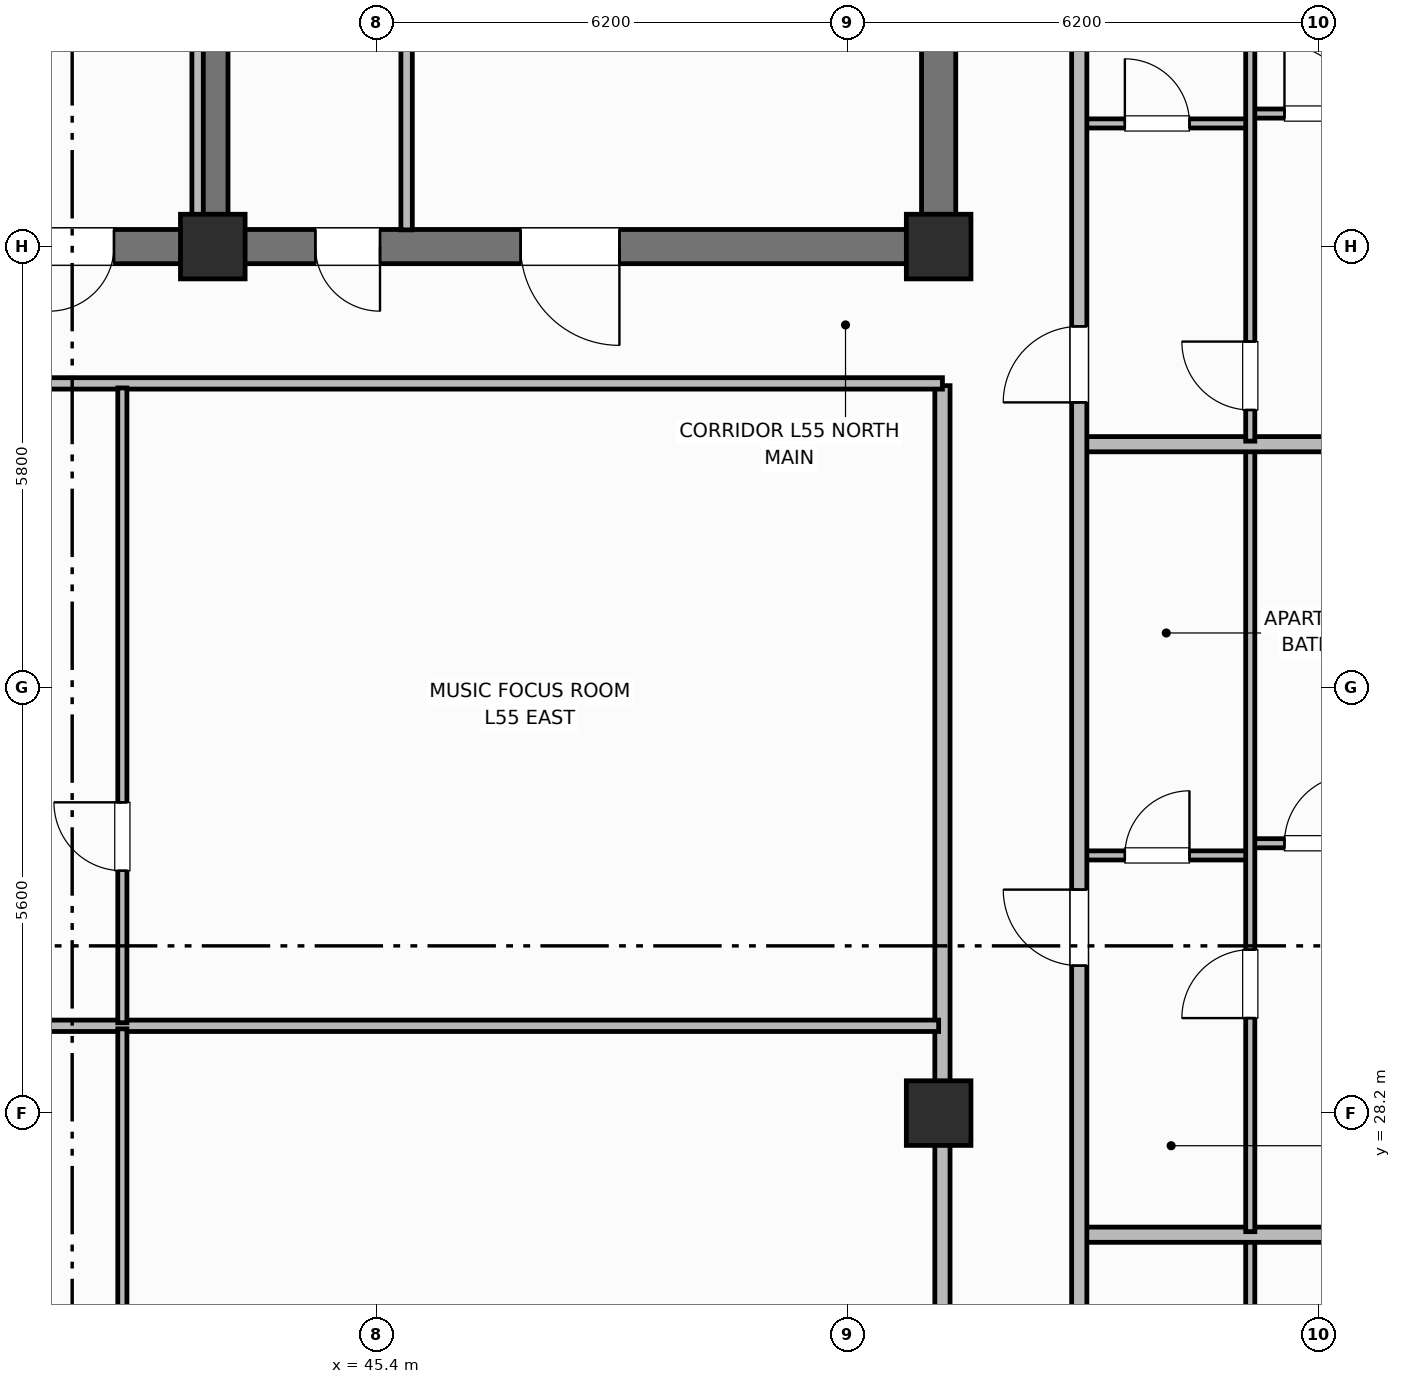
"""IFC4 building model, lengths in metres.
Left out: names, types, materials, properties, quantities, classifications, styles, units other than length and angle.
Written with IfcOpenShell. Run it as: python <this file> out.ifc"""

import sys

from ifc_helpers import new_model, si_unit, direction, frame, frame_2d, origin, origin_2d, place, context, subcontext, project, spatial, rectangle, extrude, element, fill, save


model = new_model("IFC4")
c1 = context("Model", 3, precision=1e-05, world=origin(), true_north=direction((0.0, 1.0)))
c2 = subcontext(c1, "Body", "Model", "MODEL_VIEW")
j1 = project(units=[si_unit("LENGTHUNIT", "METRE"), si_unit("PLANEANGLEUNIT", "RADIAN")], contexts=[c1])
p1 = place(None, origin())
s1 = spatial("IfcSite", under=j1, at=p1, CompositionType="ELEMENT")
p2 = place(p1, origin())
s2 = spatial("IfcBuilding", under=s1, at=p2, CompositionType="ELEMENT")
p3 = place(p2, frame((0.0, 0.0, 222.1)))
s3 = spatial("IfcBuildingStorey", under=s2, at=p3, CompositionType="ELEMENT", Elevation=222.1)
p4 = place(p3, frame((52.8, 39.825, 0.0), z_axis=(0.0, 0.0, 1.0), x_axis=(0.0, 1.0, 0.0)))
e1 = element("IfcWall", 1, at=p4, inside=s3, PredefinedType="SHEAR", context=c2, shape_type="SweptSolid", body=[
    extrude(rectangle(XDim=5.75, YDim=0.45, at=frame_2d((2.875, 0.0))), origin(), (0.0, 0.0, 1.0), 3.7),
])
p5 = place(p3, frame((52.8, 39.6, 0.0), z_axis=(0.0, 0.0, 1.0), x_axis=(-1.0, 0.0, 0.0)))
e2 = element("IfcWall", 2, at=p5, inside=s3, PredefinedType="SHEAR", context=c2, shape_type="SweptSolid", body=[
    extrude(rectangle(XDim=27.2, YDim=0.45, at=frame_2d((13.6, 0.0))), origin(), (0.0, 0.0, 1.0), 3.7),
])
p6 = place(p5, frame((24.3, 0.0, 0.0)))
e3 = element("IfcOpeningElement", 3, at=p6, cuts=e2, PredefinedType="OPENING", context=c2, shape_type="SweptSolid", body=[
    extrude(rectangle(XDim=1.1, YDim=2.15, at=frame_2d((0.55, 1.075))), frame((0.0, 0.235, 0.0), z_axis=(0.0, -1.0, 0.0), x_axis=(1.0, 0.0, 0.0)), (0.0, 0.0, 1.0), 0.47),
])
p7 = place(p5, frame((21.85, 0.0, 0.0)))
e4 = element("IfcOpeningElement", 4, at=p7, cuts=e2, PredefinedType="OPENING", context=c2, shape_type="SweptSolid", body=[
    extrude(rectangle(XDim=0.85, YDim=2.1, at=frame_2d((0.425, 1.05))), frame((0.0, 0.235, 0.0), z_axis=(0.0, -1.0, 0.0), x_axis=(1.0, 0.0, 0.0)), (0.0, 0.0, 1.0), 0.47),
])
p8 = place(p5, frame((19.85, 0.0, 0.0)))
e5 = element("IfcOpeningElement", 5, at=p8, cuts=e2, PredefinedType="OPENING", context=c2, shape_type="SweptSolid", body=[
    extrude(rectangle(XDim=0.85, YDim=2.1, at=frame_2d((0.425, 1.05))), frame((0.0, 0.235, 0.0), z_axis=(0.0, -1.0, 0.0), x_axis=(1.0, 0.0, 0.0)), (0.0, 0.0, 1.0), 0.47),
])
p9 = place(p5, frame((15.1, 0.0, 0.0)))
e6 = element("IfcOpeningElement", 6, at=p9, cuts=e2, PredefinedType="OPENING", context=c2, shape_type="SweptSolid", body=[
    extrude(rectangle(XDim=1.2, YDim=2.15, at=frame_2d((0.6, 1.075))), frame((0.0, 0.235, 0.0), z_axis=(0.0, -1.0, 0.0), x_axis=(1.0, 0.0, 0.0)), (0.0, 0.0, 1.0), 0.47),
])
p10 = place(p5, frame((12.6, 0.0, 0.0)))
e7 = element("IfcOpeningElement", 7, at=p10, cuts=e2, PredefinedType="OPENING", context=c2, shape_type="SweptSolid", body=[
    extrude(rectangle(XDim=0.85, YDim=2.1, at=frame_2d((0.425, 1.05))), frame((0.0, 0.235, 0.0), z_axis=(0.0, -1.0, 0.0), x_axis=(1.0, 0.0, 0.0)), (0.0, 0.0, 1.0), 0.47),
])
p11 = place(p5, frame((10.85, 0.0, 0.0)))
e8 = element("IfcOpeningElement", 8, at=p11, cuts=e2, PredefinedType="OPENING", context=c2, shape_type="SweptSolid", body=[
    extrude(rectangle(XDim=0.85, YDim=2.1, at=frame_2d((0.425, 1.05))), frame((0.0, 0.235, 0.0), z_axis=(0.0, -1.0, 0.0), x_axis=(1.0, 0.0, 0.0)), (0.0, 0.0, 1.0), 0.47),
])
p12 = place(p5, frame((7.35, 0.0, 0.0)))
e9 = element("IfcOpeningElement", 9, at=p12, cuts=e2, PredefinedType="OPENING", context=c2, shape_type="SweptSolid", body=[
    extrude(rectangle(XDim=0.85, YDim=2.1, at=frame_2d((0.425, 1.05))), frame((0.0, 0.235, 0.0), z_axis=(0.0, -1.0, 0.0), x_axis=(1.0, 0.0, 0.0)), (0.0, 0.0, 1.0), 0.47),
])
p13 = place(p5, frame((4.2, 0.0, 0.0)))
e10 = element("IfcOpeningElement", 10, at=p13, cuts=e2, PredefinedType="OPENING", context=c2, shape_type="SweptSolid", body=[
    extrude(rectangle(XDim=1.3, YDim=2.2, at=frame_2d((0.65, 1.1))), frame((0.0, 0.235, 0.0), z_axis=(0.0, -1.0, 0.0), x_axis=(1.0, 0.0, 0.0)), (0.0, 0.0, 1.0), 0.47),
])
p14 = place(p3, frame((43.25, 39.825, 0.0), z_axis=(0.0, 0.0, 1.0), x_axis=(0.0, 1.0, 0.0)))
e11 = element("IfcWall", 11, at=p14, inside=s3, PredefinedType="SHEAR", context=c2, shape_type="SweptSolid", body=[
    extrude(rectangle(XDim=5.75, YDim=0.4, at=frame_2d((2.875, 0.0))), origin(), (0.0, 0.0, 1.0), 3.7),
])
for number, where, z_axis, x_axis in (
    (12, (43.25, 39.6, 0.0), (0.0, 0.0, 1.0), (1.0, 0.0, 0.0)),
    (13, (52.8, 39.6, 0.0), (0.0, 0.0, 1.0), (1.0, 0.0, 0.0)),
    (14, (52.8, 28.2, 0.0), (0.0, 0.0, 1.0), (1.0, 0.0, 0.0)),
):
    element("IfcColumn", number, at=place(p3, frame(where, z_axis=z_axis, x_axis=x_axis)), inside=s3, PredefinedType="COLUMN", context=c2, shape_type="SweptSolid", body=[
        extrude(rectangle(XDim=0.85, YDim=0.85, at=origin_2d()), origin(), (0.0, 0.0, 1.0), 3.7),
    ])
for number, where, z_axis, x_axis in (
    (15, (43.05, 39.82, 0.0), (0.0, 0.0, 1.0), (0.0, 1.0, 0.0)),
    (16, (45.8, 39.82, 0.0), (0.0, 0.0, 1.0), (0.0, 1.0, 0.0)),
):
    element("IfcWall", number, at=place(p3, frame(where, z_axis=z_axis, x_axis=x_axis)), inside=s3, PredefinedType="PARTITIONING", context=c2, shape_type="SweptSolid", body=[
        extrude(rectangle(XDim=5.63, YDim=0.15, at=frame_2d((2.815, 0.0))), origin(), (0.0, 0.0, 1.0), 2.24),
    ])
p15 = place(p3, frame((52.85, 18.63, 0.0), z_axis=(0.0, 0.0, 1.0), x_axis=(0.0, 1.0, 0.0)))
e17 = element("IfcWall", 17, at=p15, inside=s3, PredefinedType="PARTITIONING", context=c2, shape_type="SweptSolid", body=[
    extrude(rectangle(XDim=19.14, YDim=0.2, at=frame_2d((9.57, 0.0))), origin(), (0.0, 0.0, 1.0), 2.24),
])
p16 = place(p3, frame((31.35, 37.8, 0.0), z_axis=(0.0, 0.0, 1.0), x_axis=(1.0, 0.0, 0.0)))
e18 = element("IfcWall", 18, at=p16, inside=s3, PredefinedType="PARTITIONING", context=c2, shape_type="SweptSolid", body=[
    extrude(rectangle(XDim=21.5, YDim=0.15, at=frame_2d((10.75, 0.0))), origin(), (0.0, 0.0, 1.0), 2.24),
])
p17 = place(p3, frame((31.38, 29.348, 0.0), z_axis=(0.0, 0.0, 1.0), x_axis=(1.0, 0.0, 0.0)))
e19 = element("IfcWall", 19, at=p17, inside=s3, PredefinedType="PARTITIONING", context=c2, shape_type="SweptSolid", body=[
    extrude(rectangle(XDim=21.42, YDim=0.15, at=frame_2d((10.71, 0.0))), origin(), (0.0, 0.0, 1.0), 2.24),
])
p18 = place(p3, frame((42.06, 18.66, 0.0), z_axis=(0.0, 0.0, 1.0), x_axis=(0.0, 1.0, 0.0)))
e20 = element("IfcWall", 20, at=p18, inside=s3, PredefinedType="PARTITIONING", context=c2, shape_type="SweptSolid", body=[
    extrude(rectangle(XDim=10.648, YDim=0.12, at=frame_2d((5.324, 0.0))), origin(), (0.0, 0.0, 1.0), 2.24),
])
p19 = place(p18, frame((2.0, 0.0, 0.0)))
e21 = element("IfcOpeningElement", 21, at=p19, cuts=e20, PredefinedType="OPENING", context=c2, shape_type="SweptSolid", body=[
    extrude(rectangle(XDim=0.9, YDim=2.1, at=frame_2d((0.45, 1.05))), frame((0.0, 0.07, 0.0), z_axis=(0.0, -1.0, 0.0), x_axis=(1.0, 0.0, 0.0)), (0.0, 0.0, 1.0), 0.14),
])
p20 = place(p3, frame((42.06, 29.388, 0.0), z_axis=(0.0, 0.0, 1.0), x_axis=(0.0, 1.0, 0.0)))
e22 = element("IfcWall", 22, at=p20, inside=s3, PredefinedType="PARTITIONING", context=c2, shape_type="SweptSolid", body=[
    extrude(rectangle(XDim=8.352, YDim=0.12, at=frame_2d((4.176, 0.0))), origin(), (0.0, 0.0, 1.0), 2.24),
])
p21 = place(p20, frame((2.0, 0.0, 0.0)))
e23 = element("IfcOpeningElement", 23, at=p21, cuts=e22, PredefinedType="OPENING", context=c2, shape_type="SweptSolid", body=[
    extrude(rectangle(XDim=0.9, YDim=2.1, at=frame_2d((0.45, 1.05))), frame((0.0, 0.07, 0.0), z_axis=(0.0, -1.0, 0.0), x_axis=(1.0, 0.0, 0.0)), (0.0, 0.0, 1.0), 0.14),
])
p22 = place(p3, frame((56.9, 19.44, 0.0), z_axis=(0.0, 0.0, 1.0), x_axis=(0.0, 1.0, 0.0)))
e24 = element("IfcWall", 24, at=p22, inside=s3, PredefinedType="PARTITIONING", context=c2, shape_type="SweptSolid", body=[
    extrude(rectangle(XDim=7.12, YDim=0.12, at=frame_2d((3.56, 0.0))), origin(), (0.0, 0.0, 1.0), 2.24),
])
p23 = place(p22, frame((0.41, 0.0, 0.0)))
e25 = element("IfcOpeningElement", 25, at=p23, cuts=e24, PredefinedType="OPENING", context=c2, shape_type="SweptSolid", body=[
    extrude(rectangle(XDim=0.9, YDim=2.1, at=frame_2d((0.45, 1.05))), frame((0.0, 0.07, 0.0), z_axis=(0.0, -1.0, 0.0), x_axis=(1.0, 0.0, 0.0)), (0.0, 0.0, 1.0), 0.14),
])
p24 = place(p3, frame((54.65, 26.6, 0.0), z_axis=(0.0, 0.0, 1.0), x_axis=(1.0, 0.0, 0.0)))
e26 = element("IfcWall", 26, at=p24, inside=s3, PredefinedType="PARTITIONING", context=c2, shape_type="SweptSolid", body=[
    extrude(rectangle(XDim=6.609, YDim=0.2, at=frame_2d((3.304, 0.0))), origin(), (0.0, 0.0, 1.0), 2.24),
])
p25 = place(p3, frame((54.65, 31.59, 0.0), z_axis=(0.0, 0.0, 1.0), x_axis=(1.0, 0.0, 0.0)))
e27 = element("IfcWall", 27, at=p25, inside=s3, PredefinedType="PARTITIONING", context=c2, shape_type="SweptSolid", body=[
    extrude(rectangle(XDim=2.25, YDim=0.12, at=frame_2d((1.125, 0.0))), origin(), (0.0, 0.0, 1.0), 2.24),
])
p26 = place(p25, frame((0.6, 0.0, 0.0)))
e28 = element("IfcOpeningElement", 28, at=p26, cuts=e27, PredefinedType="OPENING", context=c2, shape_type="SweptSolid", body=[
    extrude(rectangle(XDim=0.85, YDim=2.1, at=frame_2d((0.425, 1.05))), frame((0.0, 0.07, 0.0), z_axis=(0.0, -1.0, 0.0), x_axis=(1.0, 0.0, 0.0)), (0.0, 0.0, 1.0), 0.14),
])
p27 = place(p3, frame((56.9, 31.75, 0.0), z_axis=(0.0, 0.0, 1.0), x_axis=(1.0, 0.0, 0.0)))
e29 = element("IfcWall", 29, at=p27, inside=s3, PredefinedType="PARTITIONING", context=c2, shape_type="SweptSolid", body=[
    extrude(rectangle(XDim=4.544, YDim=0.12, at=frame_2d((2.272, 0.0))), origin(), (0.0, 0.0, 1.0), 2.24),
])
p28 = place(p27, frame((0.45, 0.0, 0.0)))
e30 = element("IfcOpeningElement", 30, at=p28, cuts=e29, PredefinedType="OPENING", context=c2, shape_type="SweptSolid", body=[
    extrude(rectangle(XDim=0.9, YDim=2.1, at=frame_2d((0.45, 1.05))), frame((0.0, 0.07, 0.0), z_axis=(0.0, -1.0, 0.0), x_axis=(1.0, 0.0, 0.0)), (0.0, 0.0, 1.0), 0.14),
])
p29 = place(p3, frame((56.9, 26.64, 0.0), z_axis=(0.0, 0.0, 1.0), x_axis=(0.0, 1.0, 0.0)))
e31 = element("IfcWall", 31, at=p29, inside=s3, PredefinedType="PARTITIONING", context=c2, shape_type="SweptSolid", body=[
    extrude(rectangle(XDim=10.32, YDim=0.12, at=frame_2d((5.16, 0.0))), origin(), (0.0, 0.0, 1.0), 2.24),
])
p30 = place(p29, frame((2.81, 0.0, 0.0)))
e32 = element("IfcOpeningElement", 32, at=p30, cuts=e31, PredefinedType="OPENING", context=c2, shape_type="SweptSolid", body=[
    extrude(rectangle(XDim=0.9, YDim=2.1, at=frame_2d((0.45, 1.05))), frame((0.0, 0.07, 0.0), z_axis=(0.0, -1.0, 0.0), x_axis=(1.0, 0.0, 0.0)), (0.0, 0.0, 1.0), 0.14),
])
p31 = place(p3, frame((54.65, 37.0, 0.0), z_axis=(0.0, 0.0, 1.0), x_axis=(1.0, 0.0, 0.0)))
e33 = element("IfcWall", 33, at=p31, inside=s3, PredefinedType="PARTITIONING", context=c2, shape_type="SweptSolid", body=[
    extrude(rectangle(XDim=7.18, YDim=0.2, at=frame_2d((3.59, 0.0))), origin(), (0.0, 0.0, 1.0), 2.24),
])
p32 = place(p3, frame((54.65, 41.22, 0.0), z_axis=(0.0, 0.0, 1.0), x_axis=(1.0, 0.0, 0.0)))
e34 = element("IfcWall", 34, at=p32, inside=s3, PredefinedType="PARTITIONING", context=c2, shape_type="SweptSolid", body=[
    extrude(rectangle(XDim=2.25, YDim=0.12, at=frame_2d((1.125, 0.0))), origin(), (0.0, 0.0, 1.0), 2.24),
])
p33 = place(p32, frame((0.6, 0.0, 0.0)))
e35 = element("IfcOpeningElement", 35, at=p33, cuts=e34, PredefinedType="OPENING", context=c2, shape_type="SweptSolid", body=[
    extrude(rectangle(XDim=0.85, YDim=2.1, at=frame_2d((0.425, 1.05))), frame((0.0, 0.07, 0.0), z_axis=(0.0, -1.0, 0.0), x_axis=(1.0, 0.0, 0.0)), (0.0, 0.0, 1.0), 0.14),
])
p34 = place(p3, frame((56.9, 41.35, 0.0), z_axis=(0.0, 0.0, 1.0), x_axis=(1.0, 0.0, 0.0)))
e36 = element("IfcWall", 36, at=p34, inside=s3, PredefinedType="PARTITIONING", context=c2, shape_type="SweptSolid", body=[
    extrude(rectangle(XDim=4.93, YDim=0.12, at=frame_2d((2.465, 0.0))), origin(), (0.0, 0.0, 1.0), 2.24),
])
p35 = place(p34, frame((0.45, 0.0, 0.0)))
e37 = element("IfcOpeningElement", 37, at=p35, cuts=e36, PredefinedType="OPENING", context=c2, shape_type="SweptSolid", body=[
    extrude(rectangle(XDim=0.9, YDim=2.1, at=frame_2d((0.45, 1.05))), frame((0.0, 0.07, 0.0), z_axis=(0.0, -1.0, 0.0), x_axis=(1.0, 0.0, 0.0)), (0.0, 0.0, 1.0), 0.14),
])
p36 = place(p3, frame((56.9, 37.04, 0.0), z_axis=(0.0, 0.0, 1.0), x_axis=(0.0, 1.0, 0.0)))
e38 = element("IfcWall", 38, at=p36, inside=s3, PredefinedType="PARTITIONING", context=c2, shape_type="SweptSolid", body=[
    extrude(rectangle(XDim=8.72, YDim=0.12, at=frame_2d((4.36, 0.0))), origin(), (0.0, 0.0, 1.0), 2.24),
])
p37 = place(p36, frame((0.41, 0.0, 0.0)))
e39 = element("IfcOpeningElement", 39, at=p37, cuts=e38, PredefinedType="OPENING", context=c2, shape_type="SweptSolid", body=[
    extrude(rectangle(XDim=0.9, YDim=2.1, at=frame_2d((0.45, 1.05))), frame((0.0, 0.07, 0.0), z_axis=(0.0, -1.0, 0.0), x_axis=(1.0, 0.0, 0.0)), (0.0, 0.0, 1.0), 0.14),
])
p38 = place(p3, frame((54.65, 10.6, 0.0), z_axis=(0.0, 0.0, 1.0), x_axis=(0.0, 1.0, 0.0)))
e40 = element("IfcWall", 40, at=p38, inside=s3, PredefinedType="PARTITIONING", context=c2, shape_type="SweptSolid", body=[
    extrude(rectangle(XDim=35.2, YDim=0.2, at=frame_2d((17.6, 0.0))), origin(), (0.0, 0.0, 1.0), 2.24),
])
p39 = place(p38, frame((2.65, 0.0, 0.0)))
e41 = element("IfcOpeningElement", 41, at=p39, cuts=e40, PredefinedType="OPENING", context=c2, shape_type="SweptSolid", body=[
    extrude(rectangle(XDim=1.0, YDim=2.15, at=frame_2d((0.5, 1.075))), frame((0.0, 0.11, 0.0), z_axis=(0.0, -1.0, 0.0), x_axis=(1.0, 0.0, 0.0)), (0.0, 0.0, 1.0), 0.22),
])
p40 = place(p38, frame((10.81, 0.0, 0.0)))
e42 = element("IfcOpeningElement", 42, at=p40, cuts=e40, PredefinedType="OPENING", context=c2, shape_type="SweptSolid", body=[
    extrude(rectangle(XDim=1.0, YDim=2.15, at=frame_2d((0.5, 1.075))), frame((0.0, 0.11, 0.0), z_axis=(0.0, -1.0, 0.0), x_axis=(1.0, 0.0, 0.0)), (0.0, 0.0, 1.0), 0.22),
])
p41 = place(p38, frame((19.54, 0.0, 0.0)))
e43 = element("IfcOpeningElement", 43, at=p41, cuts=e40, PredefinedType="OPENING", context=c2, shape_type="SweptSolid", body=[
    extrude(rectangle(XDim=1.0, YDim=2.15, at=frame_2d((0.5, 1.075))), frame((0.0, 0.11, 0.0), z_axis=(0.0, -1.0, 0.0), x_axis=(1.0, 0.0, 0.0)), (0.0, 0.0, 1.0), 0.22),
])
p42 = place(p38, frame((26.95, 0.0, 0.0)))
e44 = element("IfcOpeningElement", 44, at=p42, cuts=e40, PredefinedType="OPENING", context=c2, shape_type="SweptSolid", body=[
    extrude(rectangle(XDim=1.0, YDim=2.15, at=frame_2d((0.5, 1.075))), frame((0.0, 0.11, 0.0), z_axis=(0.0, -1.0, 0.0), x_axis=(1.0, 0.0, 0.0)), (0.0, 0.0, 1.0), 0.22),
])
p43 = place(p21, origin())
e45 = element("IfcDoor", 45, at=p43, inside=s3, OperationType="SINGLE_SWING_RIGHT", PredefinedType="DOOR", context=c2, shape_type="SweptSolid", body=[
    extrude(rectangle(XDim=0.9, YDim=2.1, at=frame_2d((0.45, 1.05))), frame((0.0, 0.025, 0.0), z_axis=(0.0, -1.0, 0.0), x_axis=(1.0, 0.0, 0.0)), (0.0, 0.0, 1.0), 0.05),
])
fill(e23, e45)
p44 = place(p26, origin())
e46 = element("IfcDoor", 46, at=p44, inside=s3, OperationType="SINGLE_SWING_RIGHT", PredefinedType="DOOR", context=c2, shape_type="SweptSolid", body=[
    extrude(rectangle(XDim=0.85, YDim=2.1, at=frame_2d((0.425, 1.05))), frame((0.0, 0.025, 0.0), z_axis=(0.0, -1.0, 0.0), x_axis=(1.0, 0.0, 0.0)), (0.0, 0.0, 1.0), 0.05),
])
fill(e28, e46)
p45 = place(p28, origin())
e47 = element("IfcDoor", 47, at=p45, inside=s3, OperationType="SINGLE_SWING_RIGHT", PredefinedType="DOOR", context=c2, shape_type="SweptSolid", body=[
    extrude(rectangle(XDim=0.9, YDim=2.1, at=frame_2d((0.45, 1.05))), frame((0.0, 0.025, 0.0), z_axis=(0.0, -1.0, 0.0), x_axis=(1.0, 0.0, 0.0)), (0.0, 0.0, 1.0), 0.05),
])
fill(e30, e47)
p46 = place(p30, origin())
e48 = element("IfcDoor", 48, at=p46, inside=s3, OperationType="SINGLE_SWING_LEFT", PredefinedType="DOOR", context=c2, shape_type="SweptSolid", body=[
    extrude(rectangle(XDim=0.9, YDim=2.1, at=frame_2d((0.45, 1.05))), frame((0.0, 0.025, 0.0), z_axis=(0.0, -1.0, 0.0), x_axis=(1.0, 0.0, 0.0)), (0.0, 0.0, 1.0), 0.05),
])
fill(e32, e48)
p47 = place(p33, origin())
e49 = element("IfcDoor", 49, at=p47, inside=s3, OperationType="SINGLE_SWING_LEFT", PredefinedType="DOOR", context=c2, shape_type="SweptSolid", body=[
    extrude(rectangle(XDim=0.85, YDim=2.1, at=frame_2d((0.425, 1.05))), frame((0.0, 0.025, 0.0), z_axis=(0.0, -1.0, 0.0), x_axis=(1.0, 0.0, 0.0)), (0.0, 0.0, 1.0), 0.05),
])
fill(e35, e49)
p48 = place(p35, origin())
e50 = element("IfcDoor", 50, at=p48, inside=s3, OperationType="SINGLE_SWING_LEFT", PredefinedType="DOOR", context=c2, shape_type="SweptSolid", body=[
    extrude(rectangle(XDim=0.9, YDim=2.1, at=frame_2d((0.45, 1.05))), frame((0.0, 0.025, 0.0), z_axis=(0.0, -1.0, 0.0), x_axis=(1.0, 0.0, 0.0)), (0.0, 0.0, 1.0), 0.05),
])
fill(e37, e50)
p49 = place(p37, origin())
e51 = element("IfcDoor", 51, at=p49, inside=s3, OperationType="SINGLE_SWING_RIGHT", PredefinedType="DOOR", context=c2, shape_type="SweptSolid", body=[
    extrude(rectangle(XDim=0.9, YDim=2.1, at=frame_2d((0.45, 1.05))), frame((0.0, 0.025, 0.0), z_axis=(0.0, -1.0, 0.0), x_axis=(1.0, 0.0, 0.0)), (0.0, 0.0, 1.0), 0.05),
])
fill(e39, e51)
p50 = place(p41, origin())
e52 = element("IfcDoor", 52, at=p50, inside=s3, OperationType="SINGLE_SWING_RIGHT", PredefinedType="DOOR", context=c2, shape_type="SweptSolid", body=[
    extrude(rectangle(XDim=1.0, YDim=2.15, at=frame_2d((0.5, 1.075))), frame((0.0, 0.025, 0.0), z_axis=(0.0, -1.0, 0.0), x_axis=(1.0, 0.0, 0.0)), (0.0, 0.0, 1.0), 0.05),
])
fill(e43, e52)
p51 = place(p42, origin())
e53 = element("IfcDoor", 53, at=p51, inside=s3, OperationType="SINGLE_SWING_LEFT", PredefinedType="DOOR", context=c2, shape_type="SweptSolid", body=[
    extrude(rectangle(XDim=1.0, YDim=2.15, at=frame_2d((0.5, 1.075))), frame((0.0, 0.025, 0.0), z_axis=(0.0, -1.0, 0.0), x_axis=(1.0, 0.0, 0.0)), (0.0, 0.0, 1.0), 0.05),
])
fill(e44, e53)
p52 = place(p11, origin())
e54 = element("IfcDoor", 54, at=p52, inside=s3, OperationType="SINGLE_SWING_RIGHT", PredefinedType="DOOR", context=c2, shape_type="SweptSolid", body=[
    extrude(rectangle(XDim=0.85, YDim=2.1, at=frame_2d((0.425, 1.05))), frame((0.0, 0.025, 0.0), z_axis=(0.0, -1.0, 0.0), x_axis=(1.0, 0.0, 0.0)), (0.0, 0.0, 1.0), 0.05),
])
fill(e8, e54)
p53 = place(p12, origin())
e55 = element("IfcDoor", 55, at=p53, inside=s3, OperationType="SINGLE_SWING_LEFT", PredefinedType="DOOR", context=c2, shape_type="SweptSolid", body=[
    extrude(rectangle(XDim=0.85, YDim=2.1, at=frame_2d((0.425, 1.05))), frame((0.0, 0.025, 0.0), z_axis=(0.0, -1.0, 0.0), x_axis=(1.0, 0.0, 0.0)), (0.0, 0.0, 1.0), 0.05),
])
fill(e9, e55)
p54 = place(p13, origin())
e56 = element("IfcDoor", 56, at=p54, inside=s3, OperationType="SINGLE_SWING_LEFT", PredefinedType="DOOR", context=c2, shape_type="SweptSolid", body=[
    extrude(rectangle(XDim=1.3, YDim=2.2, at=frame_2d((0.65, 1.1))), frame((0.0, 0.025, 0.0), z_axis=(0.0, -1.0, 0.0), x_axis=(1.0, 0.0, 0.0)), (0.0, 0.0, 1.0), 0.05),
])
fill(e10, e56)
save(model, sys.argv[1])
